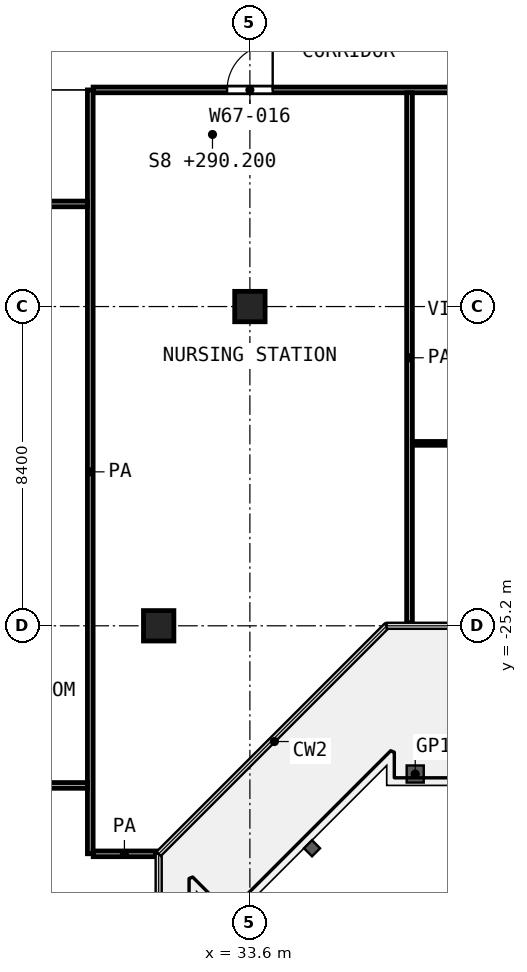
"""IFC4 building model, lengths in metres.
Left out: names, types, materials, properties, quantities, classifications, styles, units other than length and angle.
Written with IfcOpenShell. Run it as: python <this file> out.ifc"""

import sys

from ifc_helpers import new_model, si_unit, direction, frame, frame_2d, origin, origin_2d, place, context, subcontext, project, spatial, rectangle, extrude, element, fill, save


model = new_model("IFC4")
c1 = context("Model", 3, precision=1e-05, world=origin(), true_north=direction((0.0, 1.0)))
c2 = subcontext(c1, "Body", "Model", "MODEL_VIEW")
j1 = project(units=[si_unit("LENGTHUNIT", "METRE"), si_unit("PLANEANGLEUNIT", "RADIAN")], contexts=[c1])
p1 = place(None, origin())
s1 = spatial("IfcSite", under=j1, at=p1, CompositionType="ELEMENT")
p2 = place(p1, origin())
s2 = spatial("IfcBuilding", under=s1, at=p2, CompositionType="ELEMENT")
p3 = place(p2, frame((0.0, 0.0, 290.2)))
s3 = spatial("IfcBuildingStorey", under=s2, at=p3, CompositionType="ELEMENT", Elevation=290.2)
for number, where, z_axis, x_axis in (
    (1, (33.6, -16.8, 0.0), (0.0, 0.0, 1.0), (1.0, 0.0, 0.0)),
    (2, (31.2, -25.2, 0.0), (0.0, 0.0, 1.0), (1.0, 0.0, 0.0)),
):
    element("IfcColumn", number, at=place(p3, frame(where, z_axis=z_axis, x_axis=x_axis)), inside=s3, PredefinedType="COLUMN", context=c2, shape_type="SweptSolid", body=[
        extrude(rectangle(XDim=0.8, YDim=0.8, at=origin_2d()), origin(), (0.0, 0.0, 1.0), 4.2),
    ])
p4 = place(p3, frame((37.875, -20.4, 0.0), z_axis=(0.0, 0.0, 1.0), x_axis=(1.0, 0.0, 0.0)))
e3 = element("IfcWall", 3, at=p4, inside=s3, PredefinedType="PARTITIONING", context=c2, shape_type="SweptSolid", body=[
    extrude(rectangle(XDim=8.25, YDim=0.1, at=frame_2d((4.125, 0.0))), origin(), (0.0, 0.0, 1.0), 3.6),
])
p5 = place(p4, frame((4.675, 0.0, 0.0)))
e4 = element("IfcOpeningElement", 4, at=p5, cuts=e3, PredefinedType="OPENING", context=c2, shape_type="SweptSolid", body=[
    extrude(rectangle(XDim=1.0, YDim=2.1, at=frame_2d((0.5, 1.05))), frame((0.0, 0.06, 0.0), z_axis=(0.0, -1.0, 0.0), x_axis=(1.0, 0.0, 0.0)), (0.0, 0.0, 1.0), 0.12),
])
p6 = place(p3, frame((29.477, -31.2, 0.0), z_axis=(0.0, 0.0, 1.0), x_axis=(1.0, 0.0, 0.0)))
e5 = element("IfcWall", 5, at=p6, inside=s3, PredefinedType="PARTITIONING", context=c2, shape_type="SweptSolid", body=[
    extrude(rectangle(XDim=1.643, YDim=0.15, at=frame_2d((0.822, 0.0))), origin(), (0.0, 0.0, 1.0), 3.6),
])
p7 = place(p3, frame((11.175, -29.4, 0.0), z_axis=(0.0, 0.0, 1.0), x_axis=(1.0, 0.0, 0.0)))
e6 = element("IfcWall", 6, at=p7, inside=s3, PredefinedType="PARTITIONING", context=c2, shape_type="SweptSolid", body=[
    extrude(rectangle(XDim=18.15, YDim=0.15, at=frame_2d((9.075, 0.0))), origin(), (0.0, 0.0, 1.0), 3.6),
])
p8 = place(p3, frame((24.7, -14.1, 0.0), z_axis=(0.0, 0.0, 1.0), x_axis=(1.0, 0.0, 0.0)))
e7 = element("IfcWall", 7, at=p8, inside=s3, PredefinedType="PARTITIONING", context=c2, shape_type="SweptSolid", body=[
    extrude(rectangle(XDim=4.625, YDim=0.15, at=frame_2d((2.312, 0.0))), origin(), (0.0, 0.0, 1.0), 3.6),
])
p9 = place(p8, frame((1.85, 0.0, 0.0)))
e8 = element("IfcOpeningElement", 8, at=p9, cuts=e7, PredefinedType="OPENING", context=c2, shape_type="SweptSolid", body=[
    extrude(rectangle(XDim=1.5, YDim=2.1, at=frame_2d((0.75, 1.05))), frame((0.0, 0.085, 0.0), z_axis=(0.0, -1.0, 0.0), x_axis=(1.0, 0.0, 0.0)), (0.0, 0.0, 1.0), 0.17),
])
p10 = place(p3, frame((29.475, -11.1, 0.0), z_axis=(0.0, 0.0, 1.0), x_axis=(1.0, 0.0, 0.0)))
e9 = element("IfcWall", 9, at=p10, inside=s3, PredefinedType="PARTITIONING", context=c2, shape_type="SweptSolid", body=[
    extrude(rectangle(XDim=29.245, YDim=0.15, at=frame_2d((14.623, 0.0))), origin(), (0.0, 0.0, 1.0), 3.6),
])
p11 = place(p10, frame((3.525, 0.0, 0.0)))
e10 = element("IfcOpeningElement", 10, at=p11, cuts=e9, PredefinedType="OPENING", context=c2, shape_type="SweptSolid", body=[
    extrude(rectangle(XDim=1.2, YDim=2.1, at=frame_2d((0.6, 1.05))), frame((0.0, 0.085, 0.0), z_axis=(0.0, -1.0, 0.0), x_axis=(1.0, 0.0, 0.0)), (0.0, 0.0, 1.0), 0.17),
])
p12 = place(p10, frame((15.285, 0.0, 0.0)))
e11 = element("IfcOpeningElement", 11, at=p12, cuts=e9, PredefinedType="OPENING", context=c2, shape_type="SweptSolid", body=[
    extrude(rectangle(XDim=1.2, YDim=2.1, at=frame_2d((0.6, 1.05))), frame((0.0, 0.085, 0.0), z_axis=(0.0, -1.0, 0.0), x_axis=(1.0, 0.0, 0.0)), (0.0, 0.0, 1.0), 0.17),
])
p13 = place(p10, frame((13.745, 0.0, 0.0)))
e12 = element("IfcOpeningElement", 12, at=p13, cuts=e9, PredefinedType="OPENING", context=c2, shape_type="SweptSolid", body=[
    extrude(rectangle(XDim=1.2, YDim=2.1, at=frame_2d((0.6, 1.05))), frame((0.0, 0.085, 0.0), z_axis=(0.0, -1.0, 0.0), x_axis=(1.0, 0.0, 0.0)), (0.0, 0.0, 1.0), 0.17),
])
p14 = place(p10, frame((18.325, 0.0, 0.0)))
e13 = element("IfcOpeningElement", 13, at=p14, cuts=e9, PredefinedType="OPENING", context=c2, shape_type="SweptSolid", body=[
    extrude(rectangle(XDim=1.0, YDim=2.1, at=frame_2d((0.5, 1.05))), frame((0.0, 0.085, 0.0), z_axis=(0.0, -1.0, 0.0), x_axis=(1.0, 0.0, 0.0)), (0.0, 0.0, 1.0), 0.17),
])
p15 = place(p10, frame((24.375, 0.0, 0.0)))
e14 = element("IfcOpeningElement", 14, at=p15, cuts=e9, PredefinedType="OPENING", context=c2, shape_type="SweptSolid", body=[
    extrude(rectangle(XDim=1.5, YDim=2.1, at=frame_2d((0.75, 1.05))), frame((0.0, 0.085, 0.0), z_axis=(0.0, -1.0, 0.0), x_axis=(1.0, 0.0, 0.0)), (0.0, 0.0, 1.0), 0.17),
])
p16 = place(p3, frame((29.4, -31.198, 0.0), z_axis=(0.0, 0.0, 1.0), x_axis=(0.0, 1.0, 0.0)))
e15 = element("IfcWall", 15, at=p16, inside=s3, PredefinedType="PARTITIONING", context=c2, shape_type="SweptSolid", body=[
    extrude(rectangle(XDim=20.098, YDim=0.15, at=frame_2d((10.049, 0.0))), origin(), (0.0, 0.0, 1.0), 3.6),
])
p17 = place(p3, frame((37.8, -25.12, 0.0), z_axis=(0.0, 0.0, 1.0), x_axis=(0.0, 1.0, 0.0)))
e16 = element("IfcWall", 16, at=p17, inside=s3, PredefinedType="PARTITIONING", context=c2, shape_type="SweptSolid", body=[
    extrude(rectangle(XDim=13.945, YDim=0.15, at=frame_2d((6.973, 0.0))), origin(), (0.0, 0.0, 1.0), 3.6),
])
p18 = place(p11, origin())
e17 = element("IfcDoor", 17, at=p18, inside=s3, OperationType="SINGLE_SWING_RIGHT", PredefinedType="DOOR", context=c2, shape_type="SweptSolid", body=[
    extrude(rectangle(XDim=1.2, YDim=2.1, at=frame_2d((0.6, 1.05))), frame((0.0, 0.025, 0.0), z_axis=(0.0, -1.0, 0.0), x_axis=(1.0, 0.0, 0.0)), (0.0, 0.0, 1.0), 0.05),
])
fill(e10, e17)
save(model, sys.argv[1])
